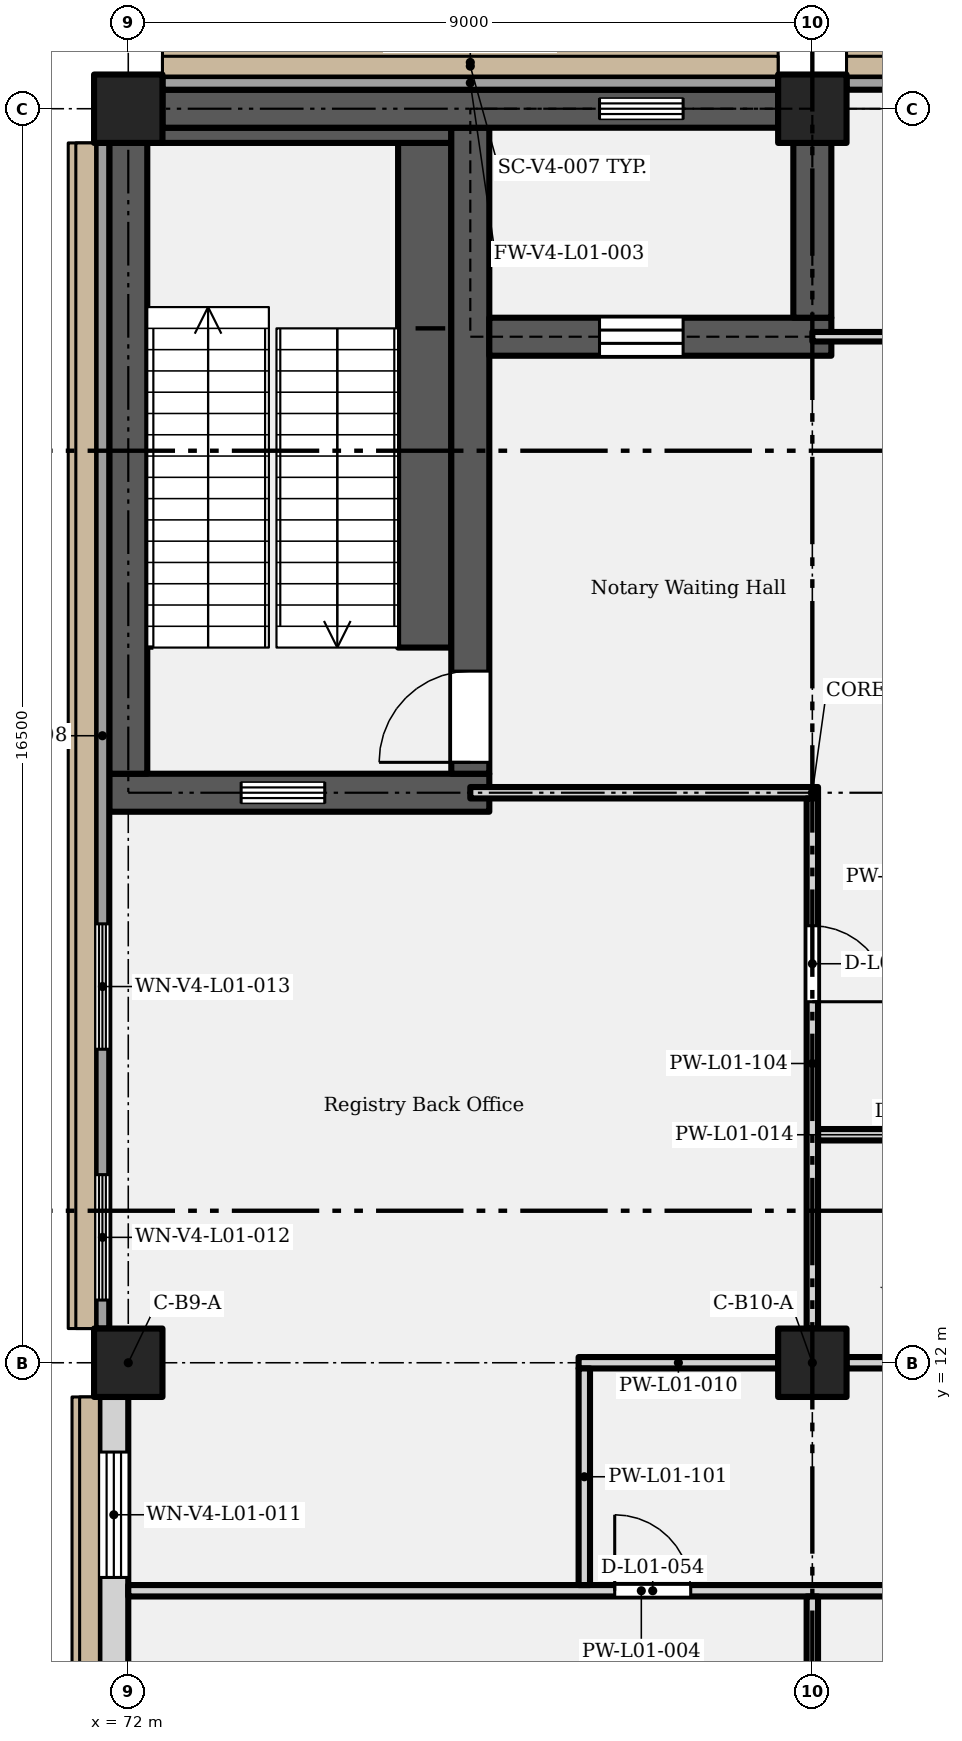
"""IFC4 building model, lengths in metres.
Left out: names, types, materials, properties, quantities, classifications, styles, units other than length and angle.
Written with IfcOpenShell. Run it as: python <this file> out.ifc"""

import sys

from ifc_helpers import new_model, si_unit, direction, frame, frame_2d, origin, origin_2d, place, context, subcontext, project, spatial, rectangle, extrude, element, fill, save


model = new_model("IFC4")
c1 = context("Model", 3, precision=1e-05, world=origin(), true_north=direction((0.0, 1.0)))
c2 = subcontext(c1, "Body", "Model", "MODEL_VIEW")
j1 = project(units=[si_unit("LENGTHUNIT", "METRE"), si_unit("PLANEANGLEUNIT", "RADIAN")], contexts=[c1])
p1 = place(None, origin())
s1 = spatial("IfcSite", under=j1, at=p1, CompositionType="ELEMENT")
p2 = place(p1, origin())
s2 = spatial("IfcBuilding", under=s1, at=p2, CompositionType="ELEMENT")
p3 = place(p2, frame((0.0, 0.0, 6.6)))
s3 = spatial("IfcBuildingStorey", under=s2, at=p3, CompositionType="ELEMENT", Elevation=6.6)
for number, where, z_axis, x_axis in (
    (1, (72.0, 12.0, 0.0), (0.0, 0.0, 1.0), (1.0, 0.0, 0.0)),
    (2, (81.0, 12.0, 0.0), (0.0, 0.0, 1.0), (1.0, 0.0, 0.0)),
    (3, (72.0, 28.5, 0.0), (0.0, 0.0, 1.0), (1.0, 0.0, 0.0)),
    (4, (81.0, 28.5, 0.0), (0.0, 0.0, 1.0), (1.0, 0.0, 0.0)),
):
    element("IfcColumn", number, at=place(p3, frame(where, z_axis=z_axis, x_axis=x_axis)), inside=s3, PredefinedType="COLUMN", context=c2, shape_type="SweptSolid", body=[
        extrude(rectangle(XDim=0.9, YDim=0.9, at=origin_2d()), origin(), (0.0, 0.0, 1.0), 5.202),
    ])
p4 = place(p3, frame((71.75, 19.5, 0.0), z_axis=(0.0, 0.0, 1.0), x_axis=(1.0, 0.0, 0.0)))
e5 = element("IfcWall", 5, at=p4, inside=s3, PredefinedType="SHEAR", context=c2, shape_type="SweptSolid", body=[
    extrude(rectangle(XDim=5.0, YDim=0.5, at=frame_2d((2.5, 0.0))), origin(), (0.0, 0.0, 1.0), 4.952),
])
p5 = place(p3, frame((72.0, 19.75, 0.0), z_axis=(0.0, 0.0, 1.0), x_axis=(0.0, 1.0, 0.0)))
e6 = element("IfcWall", 6, at=p5, inside=s3, PredefinedType="SHEAR", context=c2, shape_type="SweptSolid", body=[
    extrude(rectangle(XDim=8.3, YDim=0.5, at=frame_2d((4.15, 0.0))), origin(), (0.0, 0.0, 1.0), 4.952),
])
p6 = place(p3, frame((76.5, 19.75, 0.0), z_axis=(0.0, 0.0, 1.0), x_axis=(0.0, 1.0, 0.0)))
e7 = element("IfcWall", 7, at=p6, inside=s3, PredefinedType="SHEAR", context=c2, shape_type="SweptSolid", body=[
    extrude(rectangle(XDim=8.5, YDim=0.5, at=frame_2d((4.25, 0.0))), origin(), (0.0, 0.0, 1.0), 4.952),
])
p7 = place(p6, frame((0.15, 0.0, 0.0)))
e8 = element("IfcOpeningElement", 8, at=p7, cuts=e7, PredefinedType="OPENING", context=c2, shape_type="SweptSolid", body=[
    extrude(rectangle(XDim=1.2, YDim=2.1, at=frame_2d((0.6, 1.05))), frame((0.0, 0.26, 0.0), z_axis=(0.0, -1.0, 0.0), x_axis=(1.0, 0.0, 0.0)), (0.0, 0.0, 1.0), 0.52),
])
p8 = place(p3, frame((76.75, 25.5, 0.0), z_axis=(0.0, 0.0, 1.0), x_axis=(1.0, 0.0, 0.0)))
e9 = element("IfcWall", 9, at=p8, inside=s3, PredefinedType="SHEAR", context=c2, shape_type="SweptSolid", body=[
    extrude(rectangle(XDim=4.5, YDim=0.5, at=frame_2d((2.25, 0.0))), origin(), (0.0, 0.0, 1.0), 4.952),
])
p9 = place(p8, frame((1.45, 0.0, 0.0)))
e10 = element("IfcOpeningElement", 10, at=p9, cuts=e9, PredefinedType="OPENING", context=c2, shape_type="SweptSolid", body=[
    extrude(rectangle(XDim=1.1, YDim=2.1, at=frame_2d((0.55, 1.05))), frame((0.0, 0.26, 0.0), z_axis=(0.0, -1.0, 0.0), x_axis=(1.0, 0.0, 0.0)), (0.0, 0.0, 1.0), 0.52),
])
p10 = place(p3, frame((81.0, 25.75, 0.0), z_axis=(0.0, 0.0, 1.0), x_axis=(0.0, 1.0, 0.0)))
e11 = element("IfcWall", 11, at=p10, inside=s3, PredefinedType="SHEAR", context=c2, shape_type="SweptSolid", body=[
    extrude(rectangle(XDim=2.3, YDim=0.5, at=frame_2d((1.15, 0.0))), origin(), (0.0, 0.0, 1.0), 4.952),
])
p11 = place(p3, frame((72.45, 28.5, 0.0), z_axis=(0.0, 0.0, 1.0), x_axis=(1.0, 0.0, 0.0)))
e12 = element("IfcWall", 12, at=p11, inside=s3, PredefinedType="SHEAR", context=c2, shape_type="SweptSolid", body=[
    extrude(rectangle(XDim=8.1, YDim=0.5, at=frame_2d((4.05, 0.0))), origin(), (0.0, 0.0, 1.0), 4.952),
])
p12 = place(p3, frame((72.45, 28.84, 0.0), z_axis=(0.0, 0.0, 1.0), x_axis=(1.0, 0.0, 0.0)))
e13 = element("IfcWall", 13, at=p12, inside=s3, PredefinedType="SOLIDWALL", context=c2, shape_type="SweptSolid", body=[
    extrude(rectangle(XDim=8.1, YDim=0.18, at=frame_2d((4.05, 0.0))), origin(), (0.0, 0.0, 1.0), 4.952),
])
p13 = place(p3, frame((81.45, 28.84, 0.0), z_axis=(0.0, 0.0, 1.0), x_axis=(1.0, 0.0, 0.0)))
e14 = element("IfcWall", 14, at=p13, inside=s3, PredefinedType="SOLIDWALL", context=c2, shape_type="SweptSolid", body=[
    extrude(rectangle(XDim=8.1, YDim=0.18, at=frame_2d((4.05, 0.0))), origin(), (0.0, 0.0, 1.0), 4.952),
])
p14 = place(p13, frame((0.6, 0.0, 0.9)))
e15 = element("IfcOpeningElement", 15, at=p14, cuts=e14, PredefinedType="OPENING", context=c2, shape_type="SweptSolid", body=[
    extrude(rectangle(XDim=2.4, YDim=2.85, at=frame_2d((1.2, 1.425))), frame((0.0, 0.1, 0.0), z_axis=(0.0, -1.0, 0.0), x_axis=(1.0, 0.0, 0.0)), (0.0, 0.0, 1.0), 0.2),
])
p15 = place(p3, frame((71.81, 0.45, 0.0), z_axis=(0.0, 0.0, 1.0), x_axis=(0.0, 1.0, 0.0)))
e16 = element("IfcWall", 16, at=p15, inside=s3, PredefinedType="SOLIDWALL", context=c2, shape_type="SweptSolid", body=[
    extrude(rectangle(XDim=11.1, YDim=0.38, at=frame_2d((5.55, 0.0))), origin(), (0.0, 0.0, 1.0), 4.952),
])
p16 = place(p15, frame((0.725, 0.0, 1.05)))
e17 = element("IfcOpeningElement", 17, at=p16, cuts=e16, PredefinedType="OPENING", context=c2, shape_type="SweptSolid", body=[
    extrude(rectangle(XDim=1.65, YDim=2.1, at=frame_2d((0.825, 1.05))), frame((0.0, 0.2, 0.0), z_axis=(0.0, -1.0, 0.0), x_axis=(1.0, 0.0, 0.0)), (0.0, 0.0, 1.0), 0.4),
])
p17 = place(p15, frame((4.725, 0.0, 1.05)))
e18 = element("IfcOpeningElement", 18, at=p17, cuts=e16, PredefinedType="OPENING", context=c2, shape_type="SweptSolid", body=[
    extrude(rectangle(XDim=1.65, YDim=2.1, at=frame_2d((0.825, 1.05))), frame((0.0, 0.2, 0.0), z_axis=(0.0, -1.0, 0.0), x_axis=(1.0, 0.0, 0.0)), (0.0, 0.0, 1.0), 0.4),
])
p18 = place(p15, frame((8.725, 0.0, 1.05)))
e19 = element("IfcOpeningElement", 19, at=p18, cuts=e16, PredefinedType="OPENING", context=c2, shape_type="SweptSolid", body=[
    extrude(rectangle(XDim=1.65, YDim=2.1, at=frame_2d((0.825, 1.05))), frame((0.0, 0.2, 0.0), z_axis=(0.0, -1.0, 0.0), x_axis=(1.0, 0.0, 0.0)), (0.0, 0.0, 1.0), 0.4),
])
p19 = place(p3, frame((71.66, 12.45, 0.0), z_axis=(0.0, 0.0, 1.0), x_axis=(0.0, 1.0, 0.0)))
e20 = element("IfcWall", 20, at=p19, inside=s3, PredefinedType="SOLIDWALL", context=c2, shape_type="SweptSolid", body=[
    extrude(rectangle(XDim=15.6, YDim=0.18, at=frame_2d((7.8, 0.0))), origin(), (0.0, 0.0, 1.0), 4.952),
])
p20 = place(p19, frame((0.375, 0.0, 1.05)))
e21 = element("IfcOpeningElement", 21, at=p20, cuts=e20, PredefinedType="OPENING", context=c2, shape_type="SweptSolid", body=[
    extrude(rectangle(XDim=1.65, YDim=2.1, at=frame_2d((0.825, 1.05))), frame((0.0, 0.1, 0.0), z_axis=(0.0, -1.0, 0.0), x_axis=(1.0, 0.0, 0.0)), (0.0, 0.0, 1.0), 0.2),
])
p21 = place(p19, frame((3.675, 0.0, 1.05)))
e22 = element("IfcOpeningElement", 22, at=p21, cuts=e20, PredefinedType="OPENING", context=c2, shape_type="SweptSolid", body=[
    extrude(rectangle(XDim=1.65, YDim=2.1, at=frame_2d((0.825, 1.05))), frame((0.0, 0.1, 0.0), z_axis=(0.0, -1.0, 0.0), x_axis=(1.0, 0.0, 0.0)), (0.0, 0.0, 1.0), 0.2),
])
p22 = place(p3, frame((76.36, 25.5, 5.202), z_axis=(0.0, 0.0, 1.0), x_axis=(1.0, 0.0, 0.0)))
e23 = element("IfcWall", 23, at=p22, inside=s3, PredefinedType="SOLIDWALL", context=c2, shape_type="SweptSolid", body=[
    extrude(rectangle(XDim=4.78, YDim=0.28, at=frame_2d((2.39, 0.0))), origin(), (0.0, 0.0, 1.0), 3.1),
])
p23 = place(p22, frame((1.84, 0.0, 0.198)))
e24 = element("IfcOpeningElement", 24, at=p23, cuts=e23, PredefinedType="OPENING", context=c2, shape_type="SweptSolid", body=[
    extrude(rectangle(XDim=1.1, YDim=2.1, at=frame_2d((0.55, 1.05))), frame((0.0, 0.15, 0.0), z_axis=(0.0, -1.0, 0.0), x_axis=(1.0, 0.0, 0.0)), (0.0, 0.0, 1.0), 0.3),
])
p24 = place(p3, frame((76.36, 28.5, 5.202), z_axis=(0.0, 0.0, 1.0), x_axis=(1.0, 0.0, 0.0)))
e25 = element("IfcWall", 25, at=p24, inside=s3, PredefinedType="SOLIDWALL", context=c2, shape_type="SweptSolid", body=[
    extrude(rectangle(XDim=4.78, YDim=0.28, at=frame_2d((2.39, 0.0))), origin(), (0.0, 0.0, 1.0), 3.1),
])
p25 = place(p24, frame((1.84, 0.0, 2.4)))
e26 = element("IfcOpeningElement", 26, at=p25, cuts=e25, PredefinedType="OPENING", context=c2, shape_type="SweptSolid", body=[
    extrude(rectangle(XDim=1.1, YDim=0.6, at=frame_2d((0.55, 0.3))), frame((0.0, 0.15, 0.0), z_axis=(0.0, -1.0, 0.0), x_axis=(1.0, 0.0, 0.0)), (0.0, 0.0, 1.0), 0.3),
])
for number, where, z_axis, x_axis in (
    (27, (76.5, 25.64, 5.202), (0.0, 0.0, 1.0), (0.0, 1.0, 0.0)),
    (28, (81.0, 25.64, 5.202), (0.0, 0.0, 1.0), (0.0, 1.0, 0.0)),
):
    element("IfcWall", number, at=place(p3, frame(where, z_axis=z_axis, x_axis=x_axis)), inside=s3, PredefinedType="SOLIDWALL", context=c2, shape_type="SweptSolid", body=[
        extrude(rectangle(XDim=2.72, YDim=0.28, at=frame_2d((1.36, 0.0))), origin(), (0.0, 0.0, 1.0), 3.1),
    ])
p26 = place(p3, frame((71.43, 19.5, 5.202), z_axis=(0.0, 0.0, 1.0), x_axis=(1.0, 0.0, 0.0)))
e29 = element("IfcWall", 29, at=p26, inside=s3, PredefinedType="SOLIDWALL", context=c2, shape_type="SweptSolid", body=[
    extrude(rectangle(XDim=5.21, YDim=0.28, at=frame_2d((2.605, 0.0))), origin(), (0.0, 0.0, 1.0), 3.1),
])
p27 = place(p26, frame((2.055, 0.0, 2.4)))
e30 = element("IfcOpeningElement", 30, at=p27, cuts=e29, PredefinedType="OPENING", context=c2, shape_type="SweptSolid", body=[
    extrude(rectangle(XDim=1.1, YDim=0.6, at=frame_2d((0.55, 0.3))), frame((0.0, 0.15, 0.0), z_axis=(0.0, -1.0, 0.0), x_axis=(1.0, 0.0, 0.0)), (0.0, 0.0, 1.0), 0.3),
])
p28 = place(p3, frame((71.86, 28.5, 5.202), z_axis=(0.0, 0.0, 1.0), x_axis=(1.0, 0.0, 0.0)))
e31 = element("IfcWall", 31, at=p28, inside=s3, PredefinedType="SOLIDWALL", context=c2, shape_type="SweptSolid", body=[
    extrude(rectangle(XDim=4.5, YDim=0.28, at=frame_2d((2.25, 0.0))), origin(), (0.0, 0.0, 1.0), 3.1),
])
p29 = place(p3, frame((72.0, 19.64, 5.202), z_axis=(0.0, 0.0, 1.0), x_axis=(0.0, 1.0, 0.0)))
e32 = element("IfcWall", 32, at=p29, inside=s3, PredefinedType="SOLIDWALL", context=c2, shape_type="SweptSolid", body=[
    extrude(rectangle(XDim=8.72, YDim=0.28, at=frame_2d((4.36, 0.0))), origin(), (0.0, 0.0, 1.0), 3.1),
])
p30 = place(p3, frame((76.5, 19.64, 5.202), z_axis=(0.0, 0.0, 1.0), x_axis=(0.0, 1.0, 0.0)))
e33 = element("IfcWall", 33, at=p30, inside=s3, PredefinedType="SOLIDWALL", context=c2, shape_type="SweptSolid", body=[
    extrude(rectangle(XDim=5.72, YDim=0.28, at=frame_2d((2.86, 0.0))), origin(), (0.0, 0.0, 1.0), 3.1),
])
p31 = place(p30, frame((0.26, 0.0, 0.198)))
e34 = element("IfcOpeningElement", 34, at=p31, cuts=e33, PredefinedType="OPENING", context=c2, shape_type="SweptSolid", body=[
    extrude(rectangle(XDim=1.2, YDim=2.1, at=frame_2d((0.6, 1.05))), frame((0.0, 0.15, 0.0), z_axis=(0.0, -1.0, 0.0), x_axis=(1.0, 0.0, 0.0)), (0.0, 0.0, 1.0), 0.3),
])
p32 = place(p3, frame((72.0, 9.0, 0.0), z_axis=(0.0, 0.0, 1.0), x_axis=(1.0, 0.0, 0.0)))
e35 = element("IfcWall", 35, at=p32, inside=s3, PredefinedType="PARTITIONING", context=c2, shape_type="SweptSolid", body=[
    extrude(rectangle(XDim=13.5, YDim=0.15, at=frame_2d((6.75, 0.0))), origin(), (0.0, 0.0, 1.0), 4.952),
])
p33 = place(p32, frame((6.4, 0.0, 0.0)))
e36 = element("IfcOpeningElement", 36, at=p33, cuts=e35, PredefinedType="OPENING", context=c2, shape_type="SweptSolid", body=[
    extrude(rectangle(XDim=1.0, YDim=2.1, at=frame_2d((0.5, 1.05))), frame((0.0, 0.085, 0.0), z_axis=(0.0, -1.0, 0.0), x_axis=(1.0, 0.0, 0.0)), (0.0, 0.0, 1.0), 0.17),
])
p34 = place(p32, frame((10.75, 0.0, 0.0)))
e37 = element("IfcOpeningElement", 37, at=p34, cuts=e35, PredefinedType="OPENING", context=c2, shape_type="SweptSolid", body=[
    extrude(rectangle(XDim=1.0, YDim=2.1, at=frame_2d((0.5, 1.05))), frame((0.0, 0.085, 0.0), z_axis=(0.0, -1.0, 0.0), x_axis=(1.0, 0.0, 0.0)), (0.0, 0.0, 1.0), 0.17),
])
for number, where, z_axis, x_axis in (
    (38, (77.925, 12.0, 0.0), (0.0, 0.0, 1.0), (1.0, 0.0, 0.0)),
    (39, (81.45, 12.0, 0.0), (0.0, 0.0, 1.0), (1.0, 0.0, 0.0)),
):
    element("IfcWall", number, at=place(p3, frame(where, z_axis=z_axis, x_axis=x_axis)), inside=s3, PredefinedType="PARTITIONING", context=c2, shape_type="SweptSolid", body=[
        extrude(rectangle(XDim=2.625, YDim=0.15, at=frame_2d((1.312, 0.0))), origin(), (0.0, 0.0, 1.0), 4.202),
    ])
p35 = place(p3, frame((81.075, 15.0, 0.0), z_axis=(0.0, 0.0, 1.0), x_axis=(1.0, 0.0, 0.0)))
e40 = element("IfcWall", 40, at=p35, inside=s3, PredefinedType="PARTITIONING", context=c2, shape_type="SweptSolid", body=[
    extrude(rectangle(XDim=3.0, YDim=0.15, at=frame_2d((1.5, 0.0))), origin(), (0.0, 0.0, 1.0), 4.952),
])
p36 = place(p35, frame((0.975, 0.0, 0.0)))
e41 = element("IfcOpeningElement", 41, at=p36, cuts=e40, PredefinedType="OPENING", context=c2, shape_type="SweptSolid", body=[
    extrude(rectangle(XDim=0.9, YDim=2.1, at=frame_2d((0.45, 1.05))), frame((0.0, 0.085, 0.0), z_axis=(0.0, -1.0, 0.0), x_axis=(1.0, 0.0, 0.0)), (0.0, 0.0, 1.0), 0.17),
])
p37 = place(p3, frame((76.5, 19.5, 0.0), z_axis=(0.0, 0.0, 1.0), x_axis=(1.0, 0.0, 0.0)))
e42 = element("IfcWall", 42, at=p37, inside=s3, PredefinedType="PARTITIONING", context=c2, shape_type="SweptSolid", body=[
    extrude(rectangle(XDim=4.575, YDim=0.15, at=frame_2d((2.288, 0.0))), origin(), (0.0, 0.0, 1.0), 4.952),
])
p38 = place(p3, frame((81.0, 25.5, 0.0), z_axis=(0.0, 0.0, 1.0), x_axis=(1.0, 0.0, 0.0)))
e43 = element("IfcWall", 43, at=p38, inside=s3, PredefinedType="PARTITIONING", context=c2, shape_type="SweptSolid", body=[
    extrude(rectangle(XDim=4.25, YDim=0.125, at=frame_2d((2.125, 0.0))), origin(), (0.0, 0.0, 1.0), 4.952),
])
p39 = place(p38, frame((2.75, 0.0, 0.0), z_axis=(0.0, 0.0, 1.0), x_axis=(-1.0, 0.0, 0.0)))
e44 = element("IfcOpeningElement", 44, at=p39, cuts=e43, PredefinedType="OPENING", context=c2, shape_type="SweptSolid", body=[
    extrude(rectangle(XDim=1.0, YDim=2.1, at=frame_2d((0.5, 1.05))), frame((0.0, 0.073, 0.0), z_axis=(0.0, -1.0, 0.0), x_axis=(1.0, 0.0, 0.0)), (0.0, 0.0, 1.0), 0.145),
])
p40 = place(p3, frame((78.0, 9.075, 0.0), z_axis=(0.0, 0.0, 1.0), x_axis=(0.0, 1.0, 0.0)))
e45 = element("IfcWall", 45, at=p40, inside=s3, PredefinedType="PARTITIONING", context=c2, shape_type="SweptSolid", body=[
    extrude(rectangle(XDim=2.85, YDim=0.15, at=frame_2d((1.425, 0.0))), origin(), (0.0, 0.0, 1.0), 4.952),
])
p41 = place(p3, frame((81.0, 0.45, 0.0), z_axis=(0.0, 0.0, 1.0), x_axis=(0.0, 1.0, 0.0)))
e46 = element("IfcWall", 46, at=p41, inside=s3, PredefinedType="PARTITIONING", context=c2, shape_type="SweptSolid", body=[
    extrude(rectangle(XDim=8.475, YDim=0.15, at=frame_2d((4.238, 0.0))), origin(), (0.0, 0.0, 1.0), 4.202),
])
p42 = place(p3, frame((81.0, 12.45, 0.0), z_axis=(0.0, 0.0, 1.0), x_axis=(0.0, 1.0, 0.0)))
e47 = element("IfcWall", 47, at=p42, inside=s3, PredefinedType="PARTITIONING", context=c2, shape_type="SweptSolid", body=[
    extrude(rectangle(XDim=6.975, YDim=0.15, at=frame_2d((3.488, 0.0))), origin(), (0.0, 0.0, 1.0), 4.002),
])
p43 = place(p42, frame((5.3, 0.0, 0.0), z_axis=(0.0, 0.0, 1.0), x_axis=(-1.0, 0.0, 0.0)))
e48 = element("IfcOpeningElement", 48, at=p43, cuts=e47, PredefinedType="OPENING", context=c2, shape_type="SweptSolid", body=[
    extrude(rectangle(XDim=1.0, YDim=2.1, at=frame_2d((0.5, 1.05))), frame((0.0, 0.085, 0.0), z_axis=(0.0, -1.0, 0.0), x_axis=(1.0, 0.0, 0.0)), (0.0, 0.0, 1.0), 0.17),
])
p44 = place(p3, frame((75.9, 21.41, 0.0), z_axis=(0.0, 0.0, 1.0), x_axis=(0.0, 1.0, 0.0)))
e49 = element("IfcWall", 49, at=p44, inside=s3, PredefinedType="SHEAR", context=c2, shape_type="SweptSolid", body=[
    extrude(rectangle(XDim=6.64, YDim=0.7, at=frame_2d((3.32, 0.0))), origin(), (0.0, 0.0, 1.0), 2.587),
])
p45 = place(p3, frame((72.25, 28.15, 0.0), z_axis=(0.0, 0.0, 1.0), x_axis=(1.0, 0.0, 0.0)))
e50 = element("IfcWall", 50, at=p45, inside=s3, PredefinedType="SHEAR", context=c2, shape_type="SweptSolid", body=[
    extrude(rectangle(XDim=4.0, YDim=0.2, at=frame_2d((2.0, 0.0))), origin(), (0.0, 0.0, 1.0), 2.587),
])
p46 = place(p18, origin())
e51 = element("IfcWindow", 51, at=p46, inside=s3, PartitioningType="SINGLE_PANEL", PredefinedType="WINDOW", context=c2, shape_type="SweptSolid", body=[
    extrude(rectangle(XDim=1.65, YDim=2.1, at=frame_2d((0.825, 1.05))), frame((0.0, 0.03, 0.0), z_axis=(0.0, -1.0, 0.0), x_axis=(1.0, 0.0, 0.0)), (0.0, 0.0, 1.0), 0.06),
])
fill(e19, e51)
p47 = place(p20, origin())
e52 = element("IfcWindow", 52, at=p47, inside=s3, PartitioningType="SINGLE_PANEL", PredefinedType="WINDOW", context=c2, shape_type="SweptSolid", body=[
    extrude(rectangle(XDim=1.65, YDim=2.1, at=frame_2d((0.825, 1.05))), frame((0.0, 0.03, 0.0), z_axis=(0.0, -1.0, 0.0), x_axis=(1.0, 0.0, 0.0)), (0.0, 0.0, 1.0), 0.06),
])
fill(e21, e52)
p48 = place(p21, origin())
e53 = element("IfcWindow", 53, at=p48, inside=s3, PartitioningType="SINGLE_PANEL", PredefinedType="WINDOW", context=c2, shape_type="SweptSolid", body=[
    extrude(rectangle(XDim=1.65, YDim=2.1, at=frame_2d((0.825, 1.05))), frame((0.0, 0.03, 0.0), z_axis=(0.0, -1.0, 0.0), x_axis=(1.0, 0.0, 0.0)), (0.0, 0.0, 1.0), 0.06),
])
fill(e22, e53)
p49 = place(p25, origin())
e54 = element("IfcWindow", 54, at=p49, inside=s3, PartitioningType="SINGLE_PANEL", PredefinedType="WINDOW", context=c2, shape_type="SweptSolid", body=[
    extrude(rectangle(XDim=1.1, YDim=0.6, at=frame_2d((0.55, 0.3))), frame((0.0, 0.03, 0.0), z_axis=(0.0, -1.0, 0.0), x_axis=(1.0, 0.0, 0.0)), (0.0, 0.0, 1.0), 0.06),
])
fill(e26, e54)
p50 = place(p27, origin())
e55 = element("IfcWindow", 55, at=p50, inside=s3, PartitioningType="SINGLE_PANEL", PredefinedType="WINDOW", context=c2, shape_type="SweptSolid", body=[
    extrude(rectangle(XDim=1.1, YDim=0.6, at=frame_2d((0.55, 0.3))), frame((0.0, 0.03, 0.0), z_axis=(0.0, -1.0, 0.0), x_axis=(1.0, 0.0, 0.0)), (0.0, 0.0, 1.0), 0.06),
])
fill(e30, e55)
p51 = place(p33, origin())
e56 = element("IfcDoor", 56, at=p51, inside=s3, OperationType="SINGLE_SWING_LEFT", PredefinedType="DOOR", context=c2, shape_type="SweptSolid", body=[
    extrude(rectangle(XDim=1.0, YDim=2.1, at=frame_2d((0.5, 1.05))), frame((0.0, 0.025, 0.0), z_axis=(0.0, -1.0, 0.0), x_axis=(1.0, 0.0, 0.0)), (0.0, 0.0, 1.0), 0.05),
])
fill(e36, e56)
p52 = place(p43, origin())
e57 = element("IfcDoor", 57, at=p52, inside=s3, OperationType="SINGLE_SWING_RIGHT", PredefinedType="DOOR", context=c2, shape_type="SweptSolid", body=[
    extrude(rectangle(XDim=1.0, YDim=2.1, at=frame_2d((0.5, 1.05))), frame((0.0, 0.025, 0.0), z_axis=(0.0, -1.0, 0.0), x_axis=(1.0, 0.0, 0.0)), (0.0, 0.0, 1.0), 0.05),
])
fill(e48, e57)
p53 = place(p9, origin())
e58 = element("IfcDoor", 58, at=p53, inside=s3, OperationType="SLIDING_TO_LEFT", PredefinedType="DOOR", context=c2, shape_type="SweptSolid", body=[
    extrude(rectangle(XDim=1.1, YDim=2.1, at=frame_2d((0.55, 1.05))), frame((0.0, 0.025, 0.0), z_axis=(0.0, -1.0, 0.0), x_axis=(1.0, 0.0, 0.0)), (0.0, 0.0, 1.0), 0.05),
])
fill(e10, e58)
p54 = place(p7, origin())
e59 = element("IfcDoor", 59, at=p54, inside=s3, OperationType="SINGLE_SWING_LEFT", PredefinedType="DOOR", context=c2, shape_type="SweptSolid", body=[
    extrude(rectangle(XDim=1.2, YDim=2.1, at=frame_2d((0.6, 1.05))), frame((0.0, 0.025, 0.0), z_axis=(0.0, -1.0, 0.0), x_axis=(1.0, 0.0, 0.0)), (0.0, 0.0, 1.0), 0.05),
])
fill(e8, e59)
save(model, sys.argv[1])
